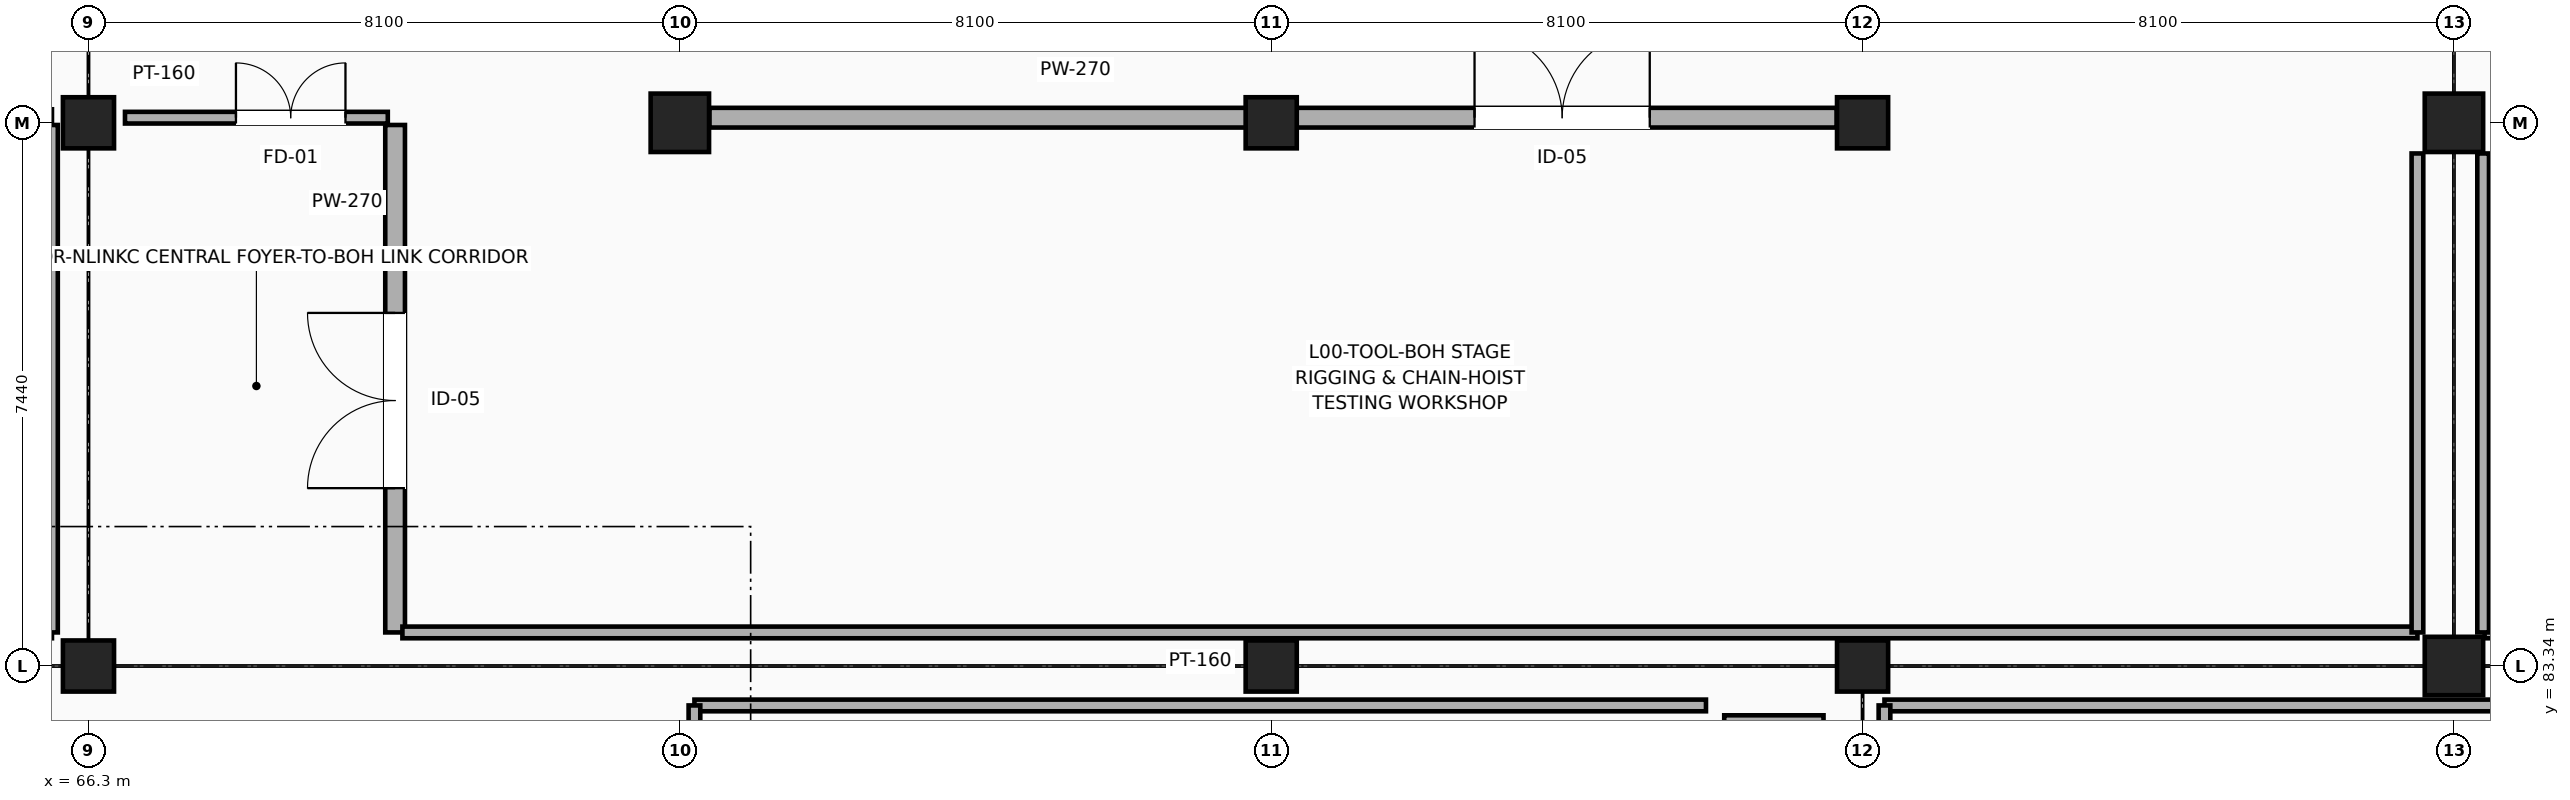
"""IFC4 building model, lengths in metres.
Left out: names, types, materials, properties, quantities, classifications, styles, units other than length and angle.
Written with IfcOpenShell. Run it as: python <this file> out.ifc"""

import sys

from ifc_helpers import new_model, si_unit, direction, frame, frame_2d, origin, origin_2d, place, context, subcontext, project, spatial, rectangle, extrude, element, fill, save


model = new_model("IFC4")
c1 = context("Model", 3, precision=1e-05, world=origin(), true_north=direction((0.0, 1.0)))
c2 = subcontext(c1, "Body", "Model", "MODEL_VIEW")
j1 = project(units=[si_unit("LENGTHUNIT", "METRE"), si_unit("PLANEANGLEUNIT", "RADIAN")], contexts=[c1])
p1 = place(None, origin())
s1 = spatial("IfcSite", under=j1, at=p1, CompositionType="ELEMENT")
p2 = place(p1, origin())
s2 = spatial("IfcBuilding", under=s1, at=p2, CompositionType="ELEMENT")
p3 = place(p2, origin())
s3 = spatial("IfcBuildingStorey", under=s2, at=p3, CompositionType="ELEMENT", Elevation=0.0)
for number, where, z_axis, x_axis in (
    (1, (66.3, 83.34, 0.0), (0.0, 0.0, 1.0), (1.0, 0.0, 0.0)),
    (2, (66.3, 90.78, 0.0), (0.0, 0.0, 1.0), (1.0, 0.0, 0.0)),
):
    element("IfcColumn", number, at=place(p3, frame(where, z_axis=z_axis, x_axis=x_axis)), inside=s3, PredefinedType="COLUMN", context=c2, shape_type="SweptSolid", body=[
        extrude(rectangle(XDim=0.7, YDim=0.7, at=origin_2d()), origin(), (0.0, 0.0, 1.0), 5.4),
    ])
p4 = place(p3, frame((74.4, 90.78, 0.0), z_axis=(0.0, 0.0, 1.0), x_axis=(1.0, 0.0, 0.0)))
e3 = element("IfcColumn", 3, at=p4, inside=s3, PredefinedType="COLUMN", context=c2, shape_type="SweptSolid", body=[
    extrude(rectangle(XDim=0.8, YDim=0.8, at=origin_2d()), origin(), (0.0, 0.0, 1.0), 5.4),
])
for number, where, z_axis, x_axis in (
    (4, (82.5, 83.34, 0.0), (0.0, 0.0, 1.0), (1.0, 0.0, 0.0)),
    (5, (82.5, 90.78, 0.0), (0.0, 0.0, 1.0), (1.0, 0.0, 0.0)),
    (6, (90.6, 83.34, 0.0), (0.0, 0.0, 1.0), (1.0, 0.0, 0.0)),
    (7, (90.6, 90.78, 0.0), (0.0, 0.0, 1.0), (1.0, 0.0, 0.0)),
):
    element("IfcColumn", number, at=place(p3, frame(where, z_axis=z_axis, x_axis=x_axis)), inside=s3, PredefinedType="COLUMN", context=c2, shape_type="SweptSolid", body=[
        extrude(rectangle(XDim=0.7, YDim=0.7, at=origin_2d()), origin(), (0.0, 0.0, 1.0), 5.4),
    ])
for number, where, z_axis, x_axis in (
    (8, (98.7, 83.34, 0.0), (0.0, 0.0, 1.0), (1.0, 0.0, 0.0)),
    (9, (98.7, 90.78, 0.0), (0.0, 0.0, 1.0), (1.0, 0.0, 0.0)),
):
    element("IfcColumn", number, at=place(p3, frame(where, z_axis=z_axis, x_axis=x_axis)), inside=s3, PredefinedType="COLUMN", context=c2, shape_type="SweptSolid", body=[
        extrude(rectangle(XDim=0.8, YDim=0.8, at=origin_2d()), origin(), (0.0, 0.0, 1.0), 5.4),
    ])
p5 = place(p3, frame((88.705, 82.605, 0.0), z_axis=(0.0, 0.0, 1.0), x_axis=(1.0, 0.0, 0.0)))
e10 = element("IfcWall", 10, at=p5, inside=s3, PredefinedType="PARTITIONING", context=c2, shape_type="SweptSolid", body=[
    extrude(rectangle(XDim=1.36, YDim=0.12, at=frame_2d((0.68, 0.0))), origin(), (0.0, 0.0, 1.0), 5.085),
])
p6 = place(p3, frame((66.8, 90.85, 0.0), z_axis=(0.0, 0.0, 1.0), x_axis=(1.0, 0.0, 0.0)))
e11 = element("IfcWall", 11, at=p6, inside=s3, PredefinedType="PARTITIONING", context=c2, shape_type="SweptSolid", body=[
    extrude(rectangle(XDim=3.6, YDim=0.16, at=frame_2d((1.8, 0.0))), origin(), (0.0, 0.0, 1.0), 4.137),
])
p7 = place(p6, frame((1.52, 0.0, 0.0)))
e12 = element("IfcOpeningElement", 12, at=p7, cuts=e11, PredefinedType="OPENING", context=c2, shape_type="SweptSolid", body=[
    extrude(rectangle(XDim=1.5, YDim=2.2, at=frame_2d((0.75, 1.1))), frame((0.0, 0.09, 0.0), z_axis=(0.0, -1.0, 0.0), x_axis=(1.0, 0.0, 0.0)), (0.0, 0.0, 1.0), 0.18),
])
p8 = place(p3, frame((70.5, 83.8, 0.0), z_axis=(0.0, 0.0, 1.0), x_axis=(0.0, 1.0, 0.0)))
e13 = element("IfcWall", 13, at=p8, inside=s3, PredefinedType="SOLIDWALL", context=c2, shape_type="SweptSolid", body=[
    extrude(rectangle(XDim=6.95, YDim=0.27, at=frame_2d((3.475, 0.0))), origin(), (0.0, 0.0, 1.0), 4.137),
])
p9 = place(p8, frame((1.976, 0.0, 0.0)))
e14 = element("IfcOpeningElement", 14, at=p9, cuts=e13, PredefinedType="OPENING", context=c2, shape_type="SweptSolid", body=[
    extrude(rectangle(XDim=2.4, YDim=2.8, at=frame_2d((1.2, 1.4))), frame((0.0, 0.145, 0.0), z_axis=(0.0, -1.0, 0.0), x_axis=(1.0, 0.0, 0.0)), (0.0, 0.0, 1.0), 0.29),
])
p10 = place(p3, frame((74.805, 90.85, 0.0), z_axis=(0.0, 0.0, 1.0), x_axis=(1.0, 0.0, 0.0)))
e15 = element("IfcWall", 15, at=p10, inside=s3, PredefinedType="SOLIDWALL", context=c2, shape_type="SweptSolid", body=[
    extrude(rectangle(XDim=15.44, YDim=0.27, at=frame_2d((7.72, 0.0))), origin(), (0.0, 0.0, 1.0), 4.037),
])
p11 = place(p10, frame((10.48, 0.0, 0.0)))
e16 = element("IfcOpeningElement", 16, at=p11, cuts=e15, PredefinedType="OPENING", context=c2, shape_type="SweptSolid", body=[
    extrude(rectangle(XDim=2.4, YDim=2.8, at=frame_2d((1.2, 1.4))), frame((0.0, 0.145, 0.0), z_axis=(0.0, -1.0, 0.0), x_axis=(1.0, 0.0, 0.0)), (0.0, 0.0, 1.0), 0.29),
])
p12 = place(p3, frame((74.6, 82.8, 0.0), z_axis=(0.0, 0.0, 1.0), x_axis=(1.0, 0.0, 0.0)))
e17 = element("IfcWall", 17, at=p12, inside=s3, PredefinedType="PARTITIONING", context=c2, shape_type="SweptSolid", body=[
    extrude(rectangle(XDim=13.855, YDim=0.16, at=frame_2d((6.927, 0.0))), origin(), (0.0, 0.0, 1.0), 4.037),
])
p13 = place(p3, frame((74.6, 73.05, 0.0), z_axis=(0.0, 0.0, 1.0), x_axis=(0.0, 1.0, 0.0)))
e18 = element("IfcWall", 18, at=p13, inside=s3, PredefinedType="PARTITIONING", context=c2, shape_type="SweptSolid", body=[
    extrude(rectangle(XDim=9.75, YDim=0.16, at=frame_2d((4.875, 0.0))), origin(), (0.0, 0.0, 1.0), 3.887),
])
p14 = place(p3, frame((90.9, 82.8, 0.0), z_axis=(0.0, 0.0, 1.0), x_axis=(1.0, 0.0, 0.0)))
e19 = element("IfcWall", 19, at=p14, inside=s3, PredefinedType="PARTITIONING", context=c2, shape_type="SweptSolid", body=[
    extrude(rectangle(XDim=17.9, YDim=0.16, at=frame_2d((8.95, 0.0))), origin(), (0.0, 0.0, 1.0), 4.337),
])
p15 = place(p3, frame((90.9, 68.83, 0.0), z_axis=(0.0, 0.0, 1.0), x_axis=(0.0, 1.0, 0.0)))
e20 = element("IfcWall", 20, at=p15, inside=s3, PredefinedType="PARTITIONING", context=c2, shape_type="SweptSolid", body=[
    extrude(rectangle(XDim=13.97, YDim=0.16, at=frame_2d((6.985, 0.0))), origin(), (0.0, 0.0, 1.0), 4.137),
])
p16 = place(p3, frame((65.8, 83.8, 0.0), z_axis=(0.0, 0.0, 1.0), x_axis=(0.0, 1.0, 0.0)))
e21 = element("IfcWall", 21, at=p16, inside=s3, PredefinedType="PARTITIONING", context=c2, shape_type="SweptSolid", body=[
    extrude(rectangle(XDim=6.95, YDim=0.16, at=frame_2d((3.475, 0.0))), origin(), (0.0, 0.0, 1.0), 4.137),
])
p17 = place(p3, frame((70.6, 83.8, 0.0), z_axis=(0.0, 0.0, 1.0), x_axis=(1.0, 0.0, 0.0)))
e22 = element("IfcWall", 22, at=p17, inside=s3, PredefinedType="PARTITIONING", context=c2, shape_type="SweptSolid", body=[
    extrude(rectangle(XDim=27.6, YDim=0.16, at=frame_2d((13.8, 0.0))), origin(), (0.0, 0.0, 1.0), 3.887),
])
p18 = place(p3, frame((98.2, 83.8, 0.0), z_axis=(0.0, 0.0, 1.0), x_axis=(0.0, 1.0, 0.0)))
e23 = element("IfcWall", 23, at=p18, inside=s3, PredefinedType="PARTITIONING", context=c2, shape_type="SweptSolid", body=[
    extrude(rectangle(XDim=6.56, YDim=0.16, at=frame_2d((3.28, 0.0))), origin(), (0.0, 0.0, 1.0), 5.085),
])
p19 = place(p3, frame((99.12, 83.8, 0.0), z_axis=(0.0, 0.0, 1.0), x_axis=(1.0, 0.0, 0.0)))
e24 = element("IfcWall", 24, at=p19, inside=s3, PredefinedType="PARTITIONING", context=c2, shape_type="SweptSolid", body=[
    extrude(rectangle(XDim=23.46, YDim=0.16, at=frame_2d((11.73, 0.0))), origin(), (0.0, 0.0, 1.0), 4.337),
])
p20 = place(p3, frame((99.1, 83.8, 0.0), z_axis=(0.0, 0.0, 1.0), x_axis=(0.0, 1.0, 0.0)))
e25 = element("IfcWall", 25, at=p20, inside=s3, PredefinedType="PARTITIONING", context=c2, shape_type="SweptSolid", body=[
    extrude(rectangle(XDim=6.56, YDim=0.16, at=frame_2d((3.28, 0.0))), origin(), (0.0, 0.0, 1.0), 5.085),
])
p21 = place(p7, origin())
e26 = element("IfcDoor", 26, at=p21, inside=s3, OperationType="DOUBLE_DOOR_SINGLE_SWING", PredefinedType="DOOR", context=c2, shape_type="SweptSolid", body=[
    extrude(rectangle(XDim=1.5, YDim=2.2, at=frame_2d((0.75, 1.1))), frame((0.0, 0.025, 0.0), z_axis=(0.0, -1.0, 0.0), x_axis=(1.0, 0.0, 0.0)), (0.0, 0.0, 1.0), 0.05),
])
fill(e12, e26)
p22 = place(p9, origin())
e27 = element("IfcDoor", 27, at=p22, inside=s3, OperationType="DOUBLE_DOOR_SINGLE_SWING", PredefinedType="DOOR", context=c2, shape_type="SweptSolid", body=[
    extrude(rectangle(XDim=2.4, YDim=2.8, at=frame_2d((1.2, 1.4))), frame((0.0, 0.025, 0.0), z_axis=(0.0, -1.0, 0.0), x_axis=(1.0, 0.0, 0.0)), (0.0, 0.0, 1.0), 0.05),
])
fill(e14, e27)
p23 = place(p11, origin())
e28 = element("IfcDoor", 28, at=p23, inside=s3, OperationType="DOUBLE_DOOR_SINGLE_SWING", PredefinedType="DOOR", context=c2, shape_type="SweptSolid", body=[
    extrude(rectangle(XDim=2.4, YDim=2.8, at=frame_2d((1.2, 1.4))), frame((0.0, 0.025, 0.0), z_axis=(0.0, -1.0, 0.0), x_axis=(1.0, 0.0, 0.0)), (0.0, 0.0, 1.0), 0.05),
])
fill(e16, e28)
save(model, sys.argv[1])
